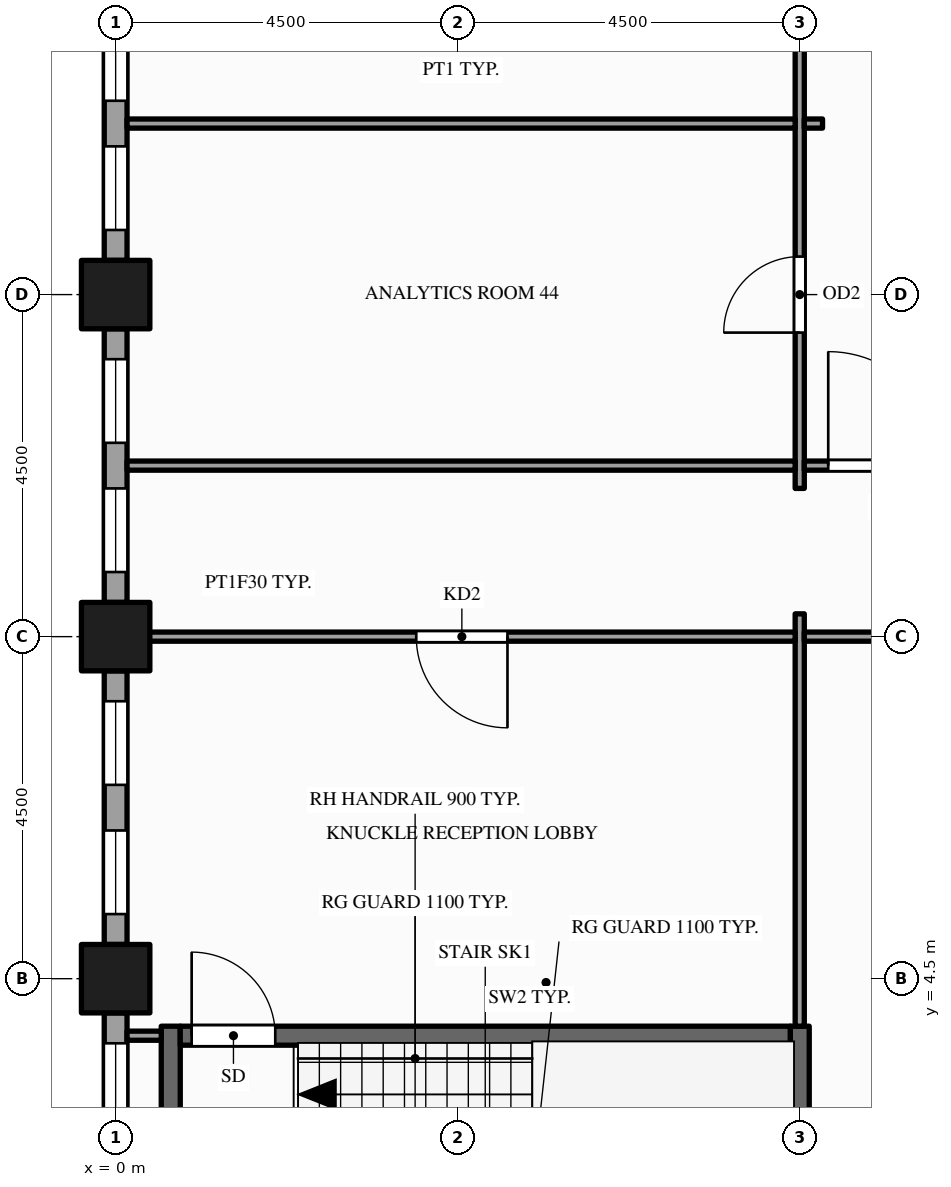
"""IFC4 building model, lengths in metres.
Left out: names, types, materials, properties, quantities, classifications, styles, units other than length and angle.
Written with IfcOpenShell. Run it as: python <this file> out.ifc"""

import sys

from ifc_helpers import new_model, si_unit, direction, frame, frame_2d, origin, origin_2d, place, context, subcontext, project, spatial, rectangle, hollow_rectangle, extrude, element, fill, save


model = new_model("IFC4")
c1 = context("Model", 3, precision=1e-05, world=origin(), true_north=direction((0.0, 1.0)))
c2 = subcontext(c1, "Body", "Model", "MODEL_VIEW")
j1 = project(units=[si_unit("LENGTHUNIT", "METRE"), si_unit("PLANEANGLEUNIT", "RADIAN")], contexts=[c1])
p1 = place(None, origin())
s1 = spatial("IfcSite", under=j1, at=p1, CompositionType="ELEMENT")
p2 = place(p1, origin())
s2 = spatial("IfcBuilding", under=s1, at=p2, CompositionType="ELEMENT")
p3 = place(p2, frame((0.0, 0.0, 143.0)))
s3 = spatial("IfcBuildingStorey", under=s2, at=p3, CompositionType="ELEMENT", Elevation=143.0)
for number, where, z_axis, x_axis in (
    (1, (0.0, 4.5, -0.15), (0.0, 0.0, 1.0), (1.0, 0.0, 0.0)),
    (2, (0.0, 9.0, -0.15), (0.0, 0.0, 1.0), (1.0, 0.0, 0.0)),
    (3, (0.0, 13.5, -0.15), (0.0, 0.0, 1.0), (1.0, 0.0, 0.0)),
):
    element("IfcColumn", number, at=place(p3, frame(where, z_axis=z_axis, x_axis=x_axis)), inside=s3, PredefinedType="COLUMN", context=c2, shape_type="SweptSolid", body=[
        extrude(hollow_rectangle(XDim=0.9, YDim=0.9, WallThickness=0.045, at=origin_2d()), origin(), (0.0, 0.0, 1.0), 4.0),
    ])
p4 = place(p3, frame((0.0, 17.55, 0.0), z_axis=(0.0, 0.0, 1.0), x_axis=(0.0, -1.0, 0.0)))
e4 = element("IfcWall", 4, at=p4, inside=s3, PredefinedType="STANDARD", context=c2, shape_type="SweptSolid", body=[
    extrude(rectangle(XDim=3.6, YDim=0.3, at=frame_2d((1.8, 0.0))), origin(), (0.0, 0.0, 1.0), 3.149),
])
p5 = place(p4, frame((0.4, 0.0, 0.9)))
e5 = element("IfcOpeningElement", 5, at=p5, cuts=e4, PredefinedType="OPENING", context=c2, shape_type="SweptSolid", body=[
    extrude(rectangle(XDim=1.1, YDim=2.0, at=frame_2d((0.55, 1.0))), frame((0.0, 0.16, 0.0), z_axis=(0.0, -1.0, 0.0), x_axis=(1.0, 0.0, 0.0)), (0.0, 0.0, 1.0), 0.32),
])
p6 = place(p4, frame((2.1, 0.0, 0.9)))
e6 = element("IfcOpeningElement", 6, at=p6, cuts=e4, PredefinedType="OPENING", context=c2, shape_type="SweptSolid", body=[
    extrude(rectangle(XDim=1.1, YDim=2.0, at=frame_2d((0.55, 1.0))), frame((0.0, 0.16, 0.0), z_axis=(0.0, -1.0, 0.0), x_axis=(1.0, 0.0, 0.0)), (0.0, 0.0, 1.0), 0.32),
])
p7 = place(p3, frame((0.0, 13.05, 0.0), z_axis=(0.0, 0.0, 1.0), x_axis=(0.0, -1.0, 0.0)))
e7 = element("IfcWall", 7, at=p7, inside=s3, PredefinedType="STANDARD", context=c2, shape_type="SweptSolid", body=[
    extrude(rectangle(XDim=3.6, YDim=0.3, at=frame_2d((1.8, 0.0))), origin(), (0.0, 0.0, 1.0), 3.149),
])
p8 = place(p7, frame((0.4, 0.0, 0.9)))
e8 = element("IfcOpeningElement", 8, at=p8, cuts=e7, PredefinedType="OPENING", context=c2, shape_type="SweptSolid", body=[
    extrude(rectangle(XDim=1.1, YDim=2.0, at=frame_2d((0.55, 1.0))), frame((0.0, 0.16, 0.0), z_axis=(0.0, -1.0, 0.0), x_axis=(1.0, 0.0, 0.0)), (0.0, 0.0, 1.0), 0.32),
])
p9 = place(p7, frame((2.1, 0.0, 0.9)))
e9 = element("IfcOpeningElement", 9, at=p9, cuts=e7, PredefinedType="OPENING", context=c2, shape_type="SweptSolid", body=[
    extrude(rectangle(XDim=1.1, YDim=2.0, at=frame_2d((0.55, 1.0))), frame((0.0, 0.16, 0.0), z_axis=(0.0, -1.0, 0.0), x_axis=(1.0, 0.0, 0.0)), (0.0, 0.0, 1.0), 0.32),
])
p10 = place(p3, frame((0.0, 8.55, 0.0), z_axis=(0.0, 0.0, 1.0), x_axis=(0.0, -1.0, 0.0)))
e10 = element("IfcWall", 10, at=p10, inside=s3, PredefinedType="STANDARD", context=c2, shape_type="SweptSolid", body=[
    extrude(rectangle(XDim=3.6, YDim=0.3, at=frame_2d((1.8, 0.0))), origin(), (0.0, 0.0, 1.0), 3.149),
])
p11 = place(p10, frame((0.4, 0.0, 0.9)))
e11 = element("IfcOpeningElement", 11, at=p11, cuts=e10, PredefinedType="OPENING", context=c2, shape_type="SweptSolid", body=[
    extrude(rectangle(XDim=1.1, YDim=2.0, at=frame_2d((0.55, 1.0))), frame((0.0, 0.16, 0.0), z_axis=(0.0, -1.0, 0.0), x_axis=(1.0, 0.0, 0.0)), (0.0, 0.0, 1.0), 0.32),
])
p12 = place(p10, frame((2.1, 0.0, 0.9)))
e12 = element("IfcOpeningElement", 12, at=p12, cuts=e10, PredefinedType="OPENING", context=c2, shape_type="SweptSolid", body=[
    extrude(rectangle(XDim=1.1, YDim=2.0, at=frame_2d((0.55, 1.0))), frame((0.0, 0.16, 0.0), z_axis=(0.0, -1.0, 0.0), x_axis=(1.0, 0.0, 0.0)), (0.0, 0.0, 1.0), 0.32),
])
p13 = place(p3, frame((0.0, 4.05, 0.0), z_axis=(0.0, 0.0, 1.0), x_axis=(0.0, -1.0, 0.0)))
e13 = element("IfcWall", 13, at=p13, inside=s3, PredefinedType="STANDARD", context=c2, shape_type="SweptSolid", body=[
    extrude(rectangle(XDim=3.6, YDim=0.3, at=frame_2d((1.8, 0.0))), origin(), (0.0, 0.0, 1.0), 3.149),
])
p14 = place(p13, frame((0.4, 0.0, 0.9)))
e14 = element("IfcOpeningElement", 14, at=p14, cuts=e13, PredefinedType="OPENING", context=c2, shape_type="SweptSolid", body=[
    extrude(rectangle(XDim=1.1, YDim=2.0, at=frame_2d((0.55, 1.0))), frame((0.0, 0.16, 0.0), z_axis=(0.0, -1.0, 0.0), x_axis=(1.0, 0.0, 0.0)), (0.0, 0.0, 1.0), 0.32),
])
p15 = place(p13, frame((2.1, 0.0, 0.9)))
e15 = element("IfcOpeningElement", 15, at=p15, cuts=e13, PredefinedType="OPENING", context=c2, shape_type="SweptSolid", body=[
    extrude(rectangle(XDim=1.1, YDim=2.0, at=frame_2d((0.55, 1.0))), frame((0.0, 0.16, 0.0), z_axis=(0.0, -1.0, 0.0), x_axis=(1.0, 0.0, 0.0)), (0.0, 0.0, 1.0), 0.32),
])
p16 = place(p3, frame((0.725, 0.6, 0.0), z_axis=(0.0, 0.0, 1.0), x_axis=(0.0, 1.0, 0.0)))
e16 = element("IfcWall", 16, at=p16, inside=s3, PredefinedType="SHEAR", context=c2, shape_type="SweptSolid", body=[
    extrude(rectangle(XDim=3.275, YDim=0.25, at=frame_2d((1.637, 0.0))), origin(), (0.0, 0.0, 1.0), 3.85),
])
p17 = place(p3, frame((9.0, 0.45, 0.0), z_axis=(0.0, 0.0, 1.0), x_axis=(0.0, 1.0, 0.0)))
e17 = element("IfcWall", 17, at=p17, inside=s3, PredefinedType="SHEAR", context=c2, shape_type="SweptSolid", body=[
    extrude(rectangle(XDim=3.425, YDim=0.25, at=frame_2d((1.712, 0.0))), origin(), (0.0, 0.0, 1.0), 3.85),
])
p18 = place(p3, frame((9.0, 3.875, 0.0), z_axis=(0.0, 0.0, 1.0), x_axis=(0.0, 1.0, 0.0)))
e18 = element("IfcWall", 18, at=p18, inside=s3, PredefinedType="PARTITIONING", context=c2, shape_type="SweptSolid", body=[
    extrude(rectangle(XDim=5.425, YDim=0.12, at=frame_2d((2.712, 0.0))), origin(), (0.0, 0.0, 1.0), 2.87),
])
p19 = place(p3, frame((9.0, 10.95, 0.0), z_axis=(0.0, 0.0, 1.0), x_axis=(0.0, 1.0, 0.0)))
e19 = element("IfcWall", 19, at=p19, inside=s3, PredefinedType="PARTITIONING", context=c2, shape_type="SweptSolid", body=[
    extrude(rectangle(XDim=20.85, YDim=0.12, at=frame_2d((10.425, 0.0))), origin(), (0.0, 0.0, 1.0), 2.6),
])
p20 = place(p19, frame((2.05, 0.0, 0.0)))
e20 = element("IfcOpeningElement", 20, at=p20, cuts=e19, PredefinedType="OPENING", context=c2, shape_type="SweptSolid", body=[
    extrude(rectangle(XDim=1.0, YDim=2.1, at=frame_2d((0.5, 1.05))), frame((0.0, 0.07, 0.0), z_axis=(0.0, -1.0, 0.0), x_axis=(1.0, 0.0, 0.0)), (0.0, 0.0, 1.0), 0.14),
])
p21 = place(p19, frame((6.55, 0.0, 0.0)))
e21 = element("IfcOpeningElement", 21, at=p21, cuts=e19, PredefinedType="OPENING", context=c2, shape_type="SweptSolid", body=[
    extrude(rectangle(XDim=1.0, YDim=2.1, at=frame_2d((0.5, 1.05))), frame((0.0, 0.07, 0.0), z_axis=(0.0, -1.0, 0.0), x_axis=(1.0, 0.0, 0.0)), (0.0, 0.0, 1.0), 0.14),
])
p22 = place(p19, frame((11.805, 0.0, 0.0)))
e22 = element("IfcOpeningElement", 22, at=p22, cuts=e19, PredefinedType="OPENING", context=c2, shape_type="SweptSolid", body=[
    extrude(rectangle(XDim=1.8, YDim=2.1, at=frame_2d((0.9, 1.05))), frame((0.0, 0.07, 0.0), z_axis=(0.0, -1.0, 0.0), x_axis=(1.0, 0.0, 0.0)), (0.0, 0.0, 1.0), 0.14),
])
p23 = place(p3, frame((0.15, 3.75, 0.0), z_axis=(0.0, 0.0, 1.0), x_axis=(1.0, 0.0, 0.0)))
e23 = element("IfcWall", 23, at=p23, inside=s3, PredefinedType="PARTITIONING", context=c2, shape_type="SweptSolid", body=[
    extrude(rectangle(XDim=0.45, YDim=0.12, at=frame_2d((0.225, 0.0))), origin(), (0.0, 0.0, 1.0), 3.85),
])
p24 = place(p3, frame((0.85, 3.75, 0.0), z_axis=(0.0, 0.0, 1.0), x_axis=(1.0, 0.0, 0.0)))
e24 = element("IfcWall", 24, at=p24, inside=s3, PredefinedType="SHEAR", context=c2, shape_type="SweptSolid", body=[
    extrude(rectangle(XDim=8.025, YDim=0.25, at=frame_2d((4.012, 0.0))), origin(), (0.0, 0.0, 1.0), 3.85),
])
p25 = place(p24, frame((0.15, 0.0, 0.0)))
e25 = element("IfcOpeningElement", 25, at=p25, cuts=e24, PredefinedType="OPENING", context=c2, shape_type="SweptSolid", body=[
    extrude(rectangle(XDim=1.1, YDim=2.1, at=frame_2d((0.55, 1.05))), frame((0.0, 0.135, 0.0), z_axis=(0.0, -1.0, 0.0), x_axis=(1.0, 0.0, 0.0)), (0.0, 0.0, 1.0), 0.27),
])
p26 = place(p3, frame((0.15, 9.0, 0.0), z_axis=(0.0, 0.0, 1.0), x_axis=(1.0, 0.0, 0.0)))
e26 = element("IfcWall", 26, at=p26, inside=s3, PredefinedType="PARTITIONING", context=c2, shape_type="SweptSolid", body=[
    extrude(rectangle(XDim=8.79, YDim=0.12, at=frame_2d((4.395, 0.0))), origin(), (0.0, 0.0, 1.0), 2.87),
])
p27 = place(p26, frame((3.805, 0.0, 0.0)))
e27 = element("IfcOpeningElement", 27, at=p27, cuts=e26, PredefinedType="OPENING", context=c2, shape_type="SweptSolid", body=[
    extrude(rectangle(XDim=1.2, YDim=2.1, at=frame_2d((0.6, 1.05))), frame((0.0, 0.07, 0.0), z_axis=(0.0, -1.0, 0.0), x_axis=(1.0, 0.0, 0.0)), (0.0, 0.0, 1.0), 0.14),
])
p28 = place(p3, frame((9.06, 9.0, 0.0), z_axis=(0.0, 0.0, 1.0), x_axis=(1.0, 0.0, 0.0)))
e28 = element("IfcWall", 28, at=p28, inside=s3, PredefinedType="PARTITIONING", context=c2, shape_type="SweptSolid", body=[
    extrude(rectangle(XDim=4.38, YDim=0.12, at=frame_2d((2.19, 0.0))), origin(), (0.0, 0.0, 1.0), 2.87),
])
p29 = place(p28, frame((1.69, 0.0, 0.0)))
e29 = element("IfcOpeningElement", 29, at=p29, cuts=e28, PredefinedType="OPENING", context=c2, shape_type="SweptSolid", body=[
    extrude(rectangle(XDim=1.0, YDim=2.1, at=frame_2d((0.5, 1.05))), frame((0.0, 0.07, 0.0), z_axis=(0.0, -1.0, 0.0), x_axis=(1.0, 0.0, 0.0)), (0.0, 0.0, 1.0), 0.14),
])
p30 = place(p3, frame((0.15, 11.25, 0.0), z_axis=(0.0, 0.0, 1.0), x_axis=(1.0, 0.0, 0.0)))
e30 = element("IfcWall", 30, at=p30, inside=s3, PredefinedType="PARTITIONING", context=c2, shape_type="SweptSolid", body=[
    extrude(rectangle(XDim=8.79, YDim=0.12, at=frame_2d((4.395, 0.0))), origin(), (0.0, 0.0, 1.0), 2.87),
])
p31 = place(p3, frame((9.06, 11.25, 0.0), z_axis=(0.0, 0.0, 1.0), x_axis=(1.0, 0.0, 0.0)))
e31 = element("IfcWall", 31, at=p31, inside=s3, PredefinedType="PARTITIONING", context=c2, shape_type="SweptSolid", body=[
    extrude(rectangle(XDim=2.13, YDim=0.12, at=frame_2d((1.065, 0.0))), origin(), (0.0, 0.0, 1.0), 2.87),
])
p32 = place(p31, frame((0.315, 0.0, 0.0)))
e32 = element("IfcOpeningElement", 32, at=p32, cuts=e31, PredefinedType="OPENING", context=c2, shape_type="SweptSolid", body=[
    extrude(rectangle(XDim=1.5, YDim=2.1, at=frame_2d((0.75, 1.05))), frame((0.0, 0.07, 0.0), z_axis=(0.0, -1.0, 0.0), x_axis=(1.0, 0.0, 0.0)), (0.0, 0.0, 1.0), 0.14),
])
p33 = place(p3, frame((0.15, 15.75, 0.0), z_axis=(0.0, 0.0, 1.0), x_axis=(1.0, 0.0, 0.0)))
e33 = element("IfcWall", 33, at=p33, inside=s3, PredefinedType="PARTITIONING", context=c2, shape_type="SweptSolid", body=[
    extrude(rectangle(XDim=8.79, YDim=0.12, at=frame_2d((4.395, 0.0))), origin(), (0.0, 0.0, 1.0), 2.87),
])
p34 = place(p3, frame((9.06, 15.75, 0.0), z_axis=(0.0, 0.0, 1.0), x_axis=(1.0, 0.0, 0.0)))
e34 = element("IfcWall", 34, at=p34, inside=s3, PredefinedType="PARTITIONING", context=c2, shape_type="SweptSolid", body=[
    extrude(rectangle(XDim=0.24, YDim=0.12, at=frame_2d((0.12, 0.0))), origin(), (0.0, 0.0, 1.0), 2.87),
])
p35 = place(p5, origin())
e35 = element("IfcWindow", 35, at=p35, inside=s3, PartitioningType="SINGLE_PANEL", PredefinedType="WINDOW", context=c2, shape_type="SweptSolid", body=[
    extrude(rectangle(XDim=1.1, YDim=2.0, at=frame_2d((0.55, 1.0))), frame((0.0, 0.03, 0.0), z_axis=(0.0, -1.0, 0.0), x_axis=(1.0, 0.0, 0.0)), (0.0, 0.0, 1.0), 0.06),
])
fill(e5, e35)
p36 = place(p6, origin())
e36 = element("IfcWindow", 36, at=p36, inside=s3, PartitioningType="SINGLE_PANEL", PredefinedType="WINDOW", context=c2, shape_type="SweptSolid", body=[
    extrude(rectangle(XDim=1.1, YDim=2.0, at=frame_2d((0.55, 1.0))), frame((0.0, 0.03, 0.0), z_axis=(0.0, -1.0, 0.0), x_axis=(1.0, 0.0, 0.0)), (0.0, 0.0, 1.0), 0.06),
])
fill(e6, e36)
p37 = place(p8, origin())
e37 = element("IfcWindow", 37, at=p37, inside=s3, PartitioningType="SINGLE_PANEL", PredefinedType="WINDOW", context=c2, shape_type="SweptSolid", body=[
    extrude(rectangle(XDim=1.1, YDim=2.0, at=frame_2d((0.55, 1.0))), frame((0.0, 0.03, 0.0), z_axis=(0.0, -1.0, 0.0), x_axis=(1.0, 0.0, 0.0)), (0.0, 0.0, 1.0), 0.06),
])
fill(e8, e37)
p38 = place(p9, origin())
e38 = element("IfcWindow", 38, at=p38, inside=s3, PartitioningType="SINGLE_PANEL", PredefinedType="WINDOW", context=c2, shape_type="SweptSolid", body=[
    extrude(rectangle(XDim=1.1, YDim=2.0, at=frame_2d((0.55, 1.0))), frame((0.0, 0.03, 0.0), z_axis=(0.0, -1.0, 0.0), x_axis=(1.0, 0.0, 0.0)), (0.0, 0.0, 1.0), 0.06),
])
fill(e9, e38)
p39 = place(p11, origin())
e39 = element("IfcWindow", 39, at=p39, inside=s3, PartitioningType="SINGLE_PANEL", PredefinedType="WINDOW", context=c2, shape_type="SweptSolid", body=[
    extrude(rectangle(XDim=1.1, YDim=2.0, at=frame_2d((0.55, 1.0))), frame((0.0, 0.03, 0.0), z_axis=(0.0, -1.0, 0.0), x_axis=(1.0, 0.0, 0.0)), (0.0, 0.0, 1.0), 0.06),
])
fill(e11, e39)
p40 = place(p12, origin())
e40 = element("IfcWindow", 40, at=p40, inside=s3, PartitioningType="SINGLE_PANEL", PredefinedType="WINDOW", context=c2, shape_type="SweptSolid", body=[
    extrude(rectangle(XDim=1.1, YDim=2.0, at=frame_2d((0.55, 1.0))), frame((0.0, 0.03, 0.0), z_axis=(0.0, -1.0, 0.0), x_axis=(1.0, 0.0, 0.0)), (0.0, 0.0, 1.0), 0.06),
])
fill(e12, e40)
p41 = place(p14, origin())
e41 = element("IfcWindow", 41, at=p41, inside=s3, PartitioningType="SINGLE_PANEL", PredefinedType="WINDOW", context=c2, shape_type="SweptSolid", body=[
    extrude(rectangle(XDim=1.1, YDim=2.0, at=frame_2d((0.55, 1.0))), frame((0.0, 0.03, 0.0), z_axis=(0.0, -1.0, 0.0), x_axis=(1.0, 0.0, 0.0)), (0.0, 0.0, 1.0), 0.06),
])
fill(e14, e41)
p42 = place(p25, origin())
e42 = element("IfcDoor", 42, at=p42, inside=s3, OperationType="SINGLE_SWING_LEFT", PredefinedType="DOOR", context=c2, shape_type="SweptSolid", body=[
    extrude(rectangle(XDim=1.1, YDim=2.1, at=frame_2d((0.55, 1.05))), frame((0.0, 0.025, 0.0), z_axis=(0.0, -1.0, 0.0), x_axis=(1.0, 0.0, 0.0)), (0.0, 0.0, 1.0), 0.05),
])
fill(e25, e42)
p43 = place(p27, origin())
e43 = element("IfcDoor", 43, at=p43, inside=s3, OperationType="SINGLE_SWING_RIGHT", PredefinedType="DOOR", context=c2, shape_type="SweptSolid", body=[
    extrude(rectangle(XDim=1.2, YDim=2.1, at=frame_2d((0.6, 1.05))), frame((0.0, 0.025, 0.0), z_axis=(0.0, -1.0, 0.0), x_axis=(1.0, 0.0, 0.0)), (0.0, 0.0, 1.0), 0.05),
])
fill(e27, e43)
p44 = place(p32, origin())
e44 = element("IfcDoor", 44, at=p44, inside=s3, OperationType="SINGLE_SWING_LEFT", PredefinedType="DOOR", context=c2, shape_type="SweptSolid", body=[
    extrude(rectangle(XDim=1.5, YDim=2.1, at=frame_2d((0.75, 1.05))), frame((0.0, 0.025, 0.0), z_axis=(0.0, -1.0, 0.0), x_axis=(1.0, 0.0, 0.0)), (0.0, 0.0, 1.0), 0.05),
])
fill(e32, e44)
p45 = place(p20, origin())
e45 = element("IfcDoor", 45, at=p45, inside=s3, OperationType="SINGLE_SWING_LEFT", PredefinedType="DOOR", context=c2, shape_type="SweptSolid", body=[
    extrude(rectangle(XDim=1.0, YDim=2.1, at=frame_2d((0.5, 1.05))), frame((0.0, 0.025, 0.0), z_axis=(0.0, -1.0, 0.0), x_axis=(1.0, 0.0, 0.0)), (0.0, 0.0, 1.0), 0.05),
])
fill(e20, e45)
save(model, sys.argv[1])
